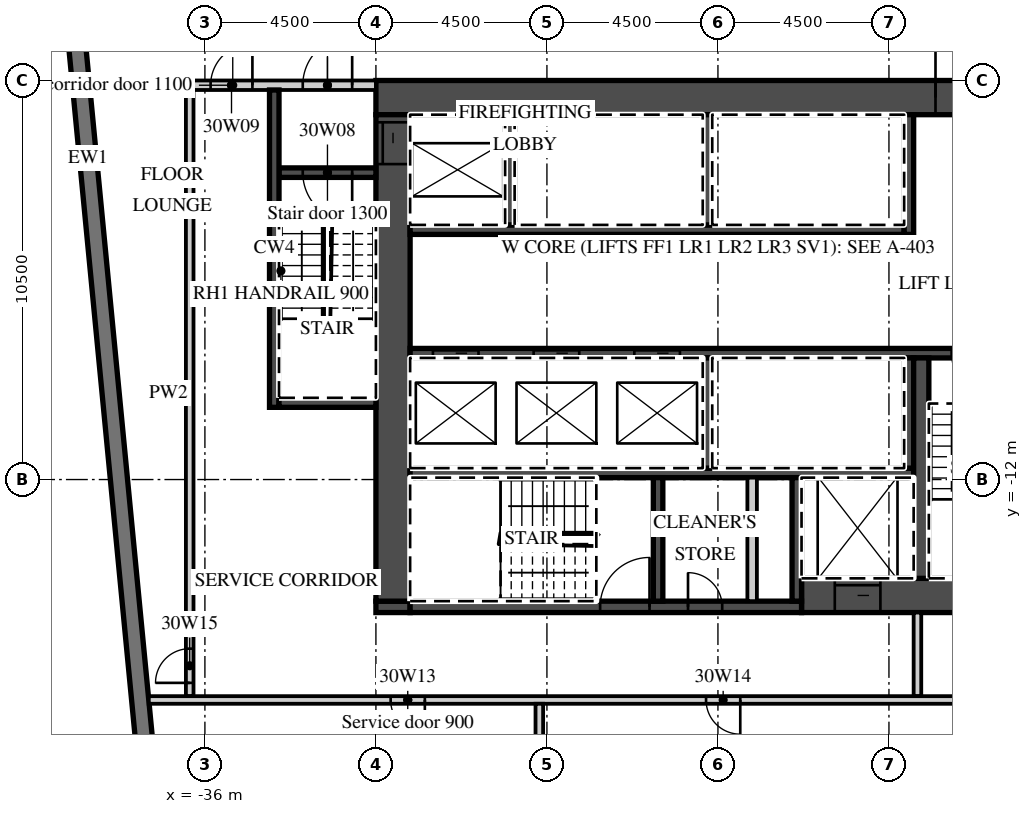
"""IFC4 building model, lengths in metres.
Left out: names, types, materials, properties, quantities, classifications, styles, units other than length and angle.
Written with IfcOpenShell. Run it as: python <this file> out.ifc"""

import sys

from ifc_helpers import new_model, si_unit, direction, frame, frame_2d, origin, place, context, subcontext, project, spatial, rectangle, extrude, element, fill, save


model = new_model("IFC4")
c1 = context("Model", 3, precision=1e-05, world=origin(), true_north=direction((0.0, 1.0)))
c2 = subcontext(c1, "Body", "Model", "MODEL_VIEW")
j1 = project(units=[si_unit("LENGTHUNIT", "METRE"), si_unit("PLANEANGLEUNIT", "RADIAN")], contexts=[c1])
p1 = place(None, origin())
s1 = spatial("IfcSite", under=j1, at=p1, CompositionType="ELEMENT")
p2 = place(p1, origin())
s2 = spatial("IfcBuilding", under=s1, at=p2, CompositionType="ELEMENT")
p3 = place(p2, frame((0.0, 0.0, 133.9)))
s3 = spatial("IfcBuildingStorey", under=s2, at=p3, CompositionType="ELEMENT", Elevation=133.9)
p4 = place(p3, frame((-40.753, 13.872, 0.0), z_axis=(0.0, 0.0, 1.0), x_axis=(0.095843327381, -0.995396431878, 0.0)))
e1 = element("IfcWall", 1, at=p4, inside=s3, PredefinedType="SOLIDWALL", context=c2, shape_type="SweptSolid", body=[
    extrude(rectangle(XDim=35.0, YDim=0.45, at=frame_2d((17.5, 0.0))), origin(), (0.0, 0.0, 1.0), 3.02),
])
p5 = place(p4, frame((4.277, 0.0, 0.45)))
e2 = element("IfcOpeningElement", 2, at=p5, cuts=e1, PredefinedType="OPENING", context=c2, shape_type="SweptSolid", body=[
    extrude(rectangle(XDim=3.3, YDim=2.25, at=frame_2d((1.65, 1.125))), frame((0.0, 0.235, 0.0), z_axis=(0.0, -1.0, 0.0), x_axis=(1.0, 0.0, 0.0)), (0.0, 0.0, 1.0), 0.47),
])
p6 = place(p4, frame((8.798, 0.0, 0.45)))
e3 = element("IfcOpeningElement", 3, at=p6, cuts=e1, PredefinedType="OPENING", context=c2, shape_type="SweptSolid", body=[
    extrude(rectangle(XDim=3.3, YDim=2.25, at=frame_2d((1.65, 1.125))), frame((0.0, 0.235, 0.0), z_axis=(0.0, -1.0, 0.0), x_axis=(1.0, 0.0, 0.0)), (0.0, 0.0, 1.0), 0.47),
])
p7 = place(p3, frame((-31.5, -1.95, 0.0), z_axis=(0.0, 0.0, 1.0), x_axis=(1.0, 0.0, 0.0)))
e4 = element("IfcWall", 4, at=p7, inside=s3, PredefinedType="SHEAR", context=c2, shape_type="SweptSolid", body=[
    extrude(rectangle(XDim=18.0, YDim=0.9, at=frame_2d((9.0, 0.0))), origin(), (0.0, 0.0, 1.0), 3.02),
])
p8 = place(p7, frame((14.725, 0.0, 0.0)))
e5 = element("IfcOpeningElement", 5, at=p8, cuts=e4, PredefinedType="OPENING", context=c2, shape_type="SweptSolid", body=[
    extrude(rectangle(XDim=1.8, YDim=2.1, at=frame_2d((0.9, 1.05))), frame((0.0, 0.46, 0.0), z_axis=(0.0, -1.0, 0.0), x_axis=(1.0, 0.0, 0.0)), (0.0, 0.0, 1.0), 0.92),
])
p9 = place(p3, frame((-20.3, -15.05, 0.0), z_axis=(0.0, 0.0, 1.0), x_axis=(1.0, 0.0, 0.0)))
e6 = element("IfcWall", 6, at=p9, inside=s3, PredefinedType="SHEAR", context=c2, shape_type="SweptSolid", body=[
    extrude(rectangle(XDim=6.8, YDim=0.9, at=frame_2d((3.4, 0.0))), origin(), (0.0, 0.0, 1.0), 3.02),
])
p10 = place(p9, frame((0.875, 0.0, 0.0)))
e7 = element("IfcOpeningElement", 7, at=p10, cuts=e6, PredefinedType="OPENING", context=c2, shape_type="SweptSolid", body=[
    extrude(rectangle(XDim=1.2, YDim=2.1, at=frame_2d((0.6, 1.05))), frame((0.0, 0.46, 0.0), z_axis=(0.0, -1.0, 0.0), x_axis=(1.0, 0.0, 0.0)), (0.0, 0.0, 1.0), 0.92),
])
p11 = place(p3, frame((-31.5, -15.35, 0.0), z_axis=(0.0, 0.0, 1.0), x_axis=(1.0, 0.0, 0.0)))
e8 = element("IfcWall", 8, at=p11, inside=s3, PredefinedType="SHEAR", context=c2, shape_type="SweptSolid", body=[
    extrude(rectangle(XDim=0.9, YDim=0.3, at=frame_2d((0.45, 0.0))), origin(), (0.0, 0.0, 1.0), 3.02),
])
p12 = place(p3, frame((-30.6, -15.35, 0.0), z_axis=(0.0, 0.0, 1.0), x_axis=(1.0, 0.0, 0.0)))
e9 = element("IfcWall", 9, at=p12, inside=s3, PredefinedType="SHEAR", context=c2, shape_type="SweptSolid", body=[
    extrude(rectangle(XDim=10.3, YDim=0.3, at=frame_2d((5.15, 0.0))), origin(), (0.0, 0.0, 1.0), 3.02),
])
p13 = place(p12, frame((5.0, 0.0, 0.0)))
e10 = element("IfcOpeningElement", 10, at=p13, cuts=e9, PredefinedType="OPENING", context=c2, shape_type="SweptSolid", body=[
    extrude(rectangle(XDim=1.3, YDim=2.1, at=frame_2d((0.65, 1.05))), frame((0.0, 0.16, 0.0), z_axis=(0.0, -1.0, 0.0), x_axis=(1.0, 0.0, 0.0)), (0.0, 0.0, 1.0), 0.32),
])
p14 = place(p12, frame((7.312, 0.0, 0.0)))
e11 = element("IfcOpeningElement", 11, at=p14, cuts=e9, PredefinedType="OPENING", context=c2, shape_type="SweptSolid", body=[
    extrude(rectangle(XDim=0.9, YDim=2.1, at=frame_2d((0.45, 1.05))), frame((0.0, 0.16, 0.0), z_axis=(0.0, -1.0, 0.0), x_axis=(1.0, 0.0, 0.0)), (0.0, 0.0, 1.0), 0.32),
])
p15 = place(p3, frame((-31.05, -15.2, 0.0), z_axis=(0.0, 0.0, 1.0), x_axis=(0.0, 1.0, 0.0)))
e12 = element("IfcWall", 12, at=p15, inside=s3, PredefinedType="SHEAR", context=c2, shape_type="SweptSolid", body=[
    extrude(rectangle(XDim=12.8, YDim=0.9, at=frame_2d((6.4, 0.0))), origin(), (0.0, 0.0, 1.0), 3.02),
])
p16 = place(p15, frame((11.5, 0.0, 0.0)))
e13 = element("IfcOpeningElement", 13, at=p16, cuts=e12, PredefinedType="OPENING", context=c2, shape_type="SweptSolid", body=[
    extrude(rectangle(XDim=1.1, YDim=2.1, at=frame_2d((0.55, 1.05))), frame((0.0, 0.46, 0.0), z_axis=(0.0, -1.0, 0.0), x_axis=(1.0, 0.0, 0.0)), (0.0, 0.0, 1.0), 0.92),
])
p17 = place(p3, frame((-30.6, -5.425, 0.0), z_axis=(0.0, 0.0, 1.0), x_axis=(1.0, 0.0, 0.0)))
e14 = element("IfcWall", 14, at=p17, inside=s3, PredefinedType="SHEAR", context=c2, shape_type="SweptSolid", body=[
    extrude(rectangle(XDim=13.0, YDim=0.25, at=frame_2d((6.5, 0.0))), origin(), (0.0, 0.0, 1.0), 3.02),
])
p18 = place(p3, frame((-17.475, -5.55, 0.0), z_axis=(0.0, 0.0, 1.0), x_axis=(0.0, 1.0, 0.0)))
e15 = element("IfcWall", 15, at=p18, inside=s3, PredefinedType="SHEAR", context=c2, shape_type="SweptSolid", body=[
    extrude(rectangle(XDim=3.15, YDim=0.25, at=frame_2d((1.575, 0.0))), origin(), (0.0, 0.0, 1.0), 3.02),
])
for number, where, z_axis, x_axis in (
    (16, (-27.975, -5.3, 0.0), (0.0, 0.0, 1.0), (0.0, 1.0, 0.0)),
    (17, (-22.775, -5.3, 0.0), (0.0, 0.0, 1.0), (0.0, 1.0, 0.0)),
):
    element("IfcWall", number, at=place(p3, frame(where, z_axis=z_axis, x_axis=x_axis)), inside=s3, PredefinedType="SHEAR", context=c2, shape_type="SweptSolid", body=[
        extrude(rectangle(XDim=2.9, YDim=0.25, at=frame_2d((1.45, 0.0))), origin(), (0.0, 0.0, 1.0), 3.02),
    ])
p19 = place(p3, frame((-30.6, -8.675, 0.0), z_axis=(0.0, 0.0, 1.0), x_axis=(1.0, 0.0, 0.0)))
e18 = element("IfcWall", 18, at=p19, inside=s3, PredefinedType="SHEAR", context=c2, shape_type="SweptSolid", body=[
    extrude(rectangle(XDim=16.2, YDim=0.25, at=frame_2d((8.1, 0.0))), origin(), (0.0, 0.0, 1.0), 3.02),
])
p20 = place(p19, frame((0.6, 0.0, 0.0)))
e19 = element("IfcOpeningElement", 19, at=p20, cuts=e18, PredefinedType="OPENING", context=c2, shape_type="SweptSolid", body=[
    extrude(rectangle(XDim=1.2, YDim=2.1, at=frame_2d((0.6, 1.05))), frame((0.0, 0.135, 0.0), z_axis=(0.0, -1.0, 0.0), x_axis=(1.0, 0.0, 0.0)), (0.0, 0.0, 1.0), 0.27),
])
p21 = place(p19, frame((3.25, 0.0, 0.0)))
e20 = element("IfcOpeningElement", 20, at=p21, cuts=e18, PredefinedType="OPENING", context=c2, shape_type="SweptSolid", body=[
    extrude(rectangle(XDim=1.2, YDim=2.1, at=frame_2d((0.6, 1.05))), frame((0.0, 0.135, 0.0), z_axis=(0.0, -1.0, 0.0), x_axis=(1.0, 0.0, 0.0)), (0.0, 0.0, 1.0), 0.27),
])
p22 = place(p19, frame((5.9, 0.0, 0.0)))
e21 = element("IfcOpeningElement", 21, at=p22, cuts=e18, PredefinedType="OPENING", context=c2, shape_type="SweptSolid", body=[
    extrude(rectangle(XDim=1.2, YDim=2.1, at=frame_2d((0.6, 1.05))), frame((0.0, 0.135, 0.0), z_axis=(0.0, -1.0, 0.0), x_axis=(1.0, 0.0, 0.0)), (0.0, 0.0, 1.0), 0.27),
])
p23 = place(p19, frame((14.25, 0.0, 0.0)))
e22 = element("IfcOpeningElement", 22, at=p23, cuts=e18, PredefinedType="OPENING", context=c2, shape_type="SweptSolid", body=[
    extrude(rectangle(XDim=1.3, YDim=2.1, at=frame_2d((0.65, 1.05))), frame((0.0, 0.135, 0.0), z_axis=(0.0, -1.0, 0.0), x_axis=(1.0, 0.0, 0.0)), (0.0, 0.0, 1.0), 0.27),
])
p24 = place(p3, frame((-30.6, -11.825, 0.0), z_axis=(0.0, 0.0, 1.0), x_axis=(1.0, 0.0, 0.0)))
e23 = element("IfcWall", 23, at=p24, inside=s3, PredefinedType="SHEAR", context=c2, shape_type="SweptSolid", body=[
    extrude(rectangle(XDim=13.25, YDim=0.25, at=frame_2d((6.625, 0.0))), origin(), (0.0, 0.0, 1.0), 3.02),
])
for number, where, z_axis, x_axis in (
    (24, (-17.475, -11.7, 0.0), (0.0, 0.0, 1.0), (0.0, 1.0, 0.0)),
    (25, (-22.775, -11.7, 0.0), (0.0, 0.0, 1.0), (0.0, 1.0, 0.0)),
):
    element("IfcWall", number, at=place(p3, frame(where, z_axis=z_axis, x_axis=x_axis)), inside=s3, PredefinedType="SHEAR", context=c2, shape_type="SweptSolid", body=[
        extrude(rectangle(XDim=2.9, YDim=0.25, at=frame_2d((1.45, 0.0))), origin(), (0.0, 0.0, 1.0), 3.02),
    ])
p25 = place(p3, frame((-17.15, -14.6, 0.0), z_axis=(0.0, 0.0, 1.0), x_axis=(0.0, 1.0, 0.0)))
e26 = element("IfcWall", 26, at=p25, inside=s3, PredefinedType="SHEAR", context=c2, shape_type="SweptSolid", body=[
    extrude(rectangle(XDim=5.8, YDim=0.4, at=frame_2d((2.9, 0.0))), origin(), (0.0, 0.0, 1.0), 3.02),
])
for number, where, z_axis, x_axis in (
    (27, (-20.425, -15.2, 0.0), (0.0, 0.0, 1.0), (0.0, 1.0, 0.0)),
    (28, (-24.075, -15.2, 0.0), (0.0, 0.0, 1.0), (0.0, 1.0, 0.0)),
):
    element("IfcWall", number, at=place(p3, frame(where, z_axis=z_axis, x_axis=x_axis)), inside=s3, PredefinedType="SHEAR", context=c2, shape_type="SweptSolid", body=[
        extrude(rectangle(XDim=3.25, YDim=0.25, at=frame_2d((1.625, 0.0))), origin(), (0.0, 0.0, 1.0), 3.02),
    ])
p26 = place(p3, frame((-21.6, -15.2, 0.0), z_axis=(0.0, 0.0, 1.0), x_axis=(0.0, 1.0, 0.0)))
e29 = element("IfcWall", 29, at=p26, inside=s3, PredefinedType="PARTITIONING", context=c2, shape_type="SweptSolid", body=[
    extrude(rectangle(XDim=3.25, YDim=0.25, at=frame_2d((1.625, 0.0))), origin(), (0.0, 0.0, 1.0), 3.02),
])
p27 = place(p3, frame((-39.035, -1.625, 0.0), z_axis=(0.0, 0.0, 1.0), x_axis=(1.0, 0.0, 0.0)))
e30 = element("IfcWall", 30, at=p27, inside=s3, PredefinedType="PARTITIONING", context=c2, shape_type="SweptSolid", body=[
    extrude(rectangle(XDim=7.535, YDim=0.25, at=frame_2d((3.768, 0.0))), origin(), (0.0, 0.0, 1.0), 3.02),
])
p28 = place(p27, frame((5.61, 0.0, 0.0)))
e31 = element("IfcOpeningElement", 31, at=p28, cuts=e30, PredefinedType="OPENING", context=c2, shape_type="SweptSolid", body=[
    extrude(rectangle(XDim=1.3, YDim=2.1, at=frame_2d((0.65, 1.05))), frame((0.0, 0.135, 0.0), z_axis=(0.0, -1.0, 0.0), x_axis=(1.0, 0.0, 0.0)), (0.0, 0.0, 1.0), 0.27),
])
p29 = place(p27, frame((3.185, 0.0, 0.0)))
e32 = element("IfcOpeningElement", 32, at=p29, cuts=e30, PredefinedType="OPENING", context=c2, shape_type="SweptSolid", body=[
    extrude(rectangle(XDim=1.1, YDim=2.1, at=frame_2d((0.55, 1.05))), frame((0.0, 0.135, 0.0), z_axis=(0.0, -1.0, 0.0), x_axis=(1.0, 0.0, 0.0)), (0.0, 0.0, 1.0), 0.27),
])
p30 = place(p3, frame((-34.05, -3.925, 0.0), z_axis=(0.0, 0.0, 1.0), x_axis=(1.0, 0.0, 0.0)))
e33 = element("IfcWall", 33, at=p30, inside=s3, PredefinedType="SHEAR", context=c2, shape_type="SweptSolid", body=[
    extrude(rectangle(XDim=2.55, YDim=0.25, at=frame_2d((1.275, 0.0))), origin(), (0.0, 0.0, 1.0), 3.02),
])
p31 = place(p30, frame((0.625, 0.0, 0.0)))
e34 = element("IfcOpeningElement", 34, at=p31, cuts=e33, PredefinedType="OPENING", context=c2, shape_type="SweptSolid", body=[
    extrude(rectangle(XDim=1.3, YDim=2.1, at=frame_2d((0.65, 1.05))), frame((0.0, 0.135, 0.0), z_axis=(0.0, -1.0, 0.0), x_axis=(1.0, 0.0, 0.0)), (0.0, 0.0, 1.0), 0.27),
])
p32 = place(p3, frame((-34.175, -10.1, 0.0), z_axis=(0.0, 0.0, 1.0), x_axis=(0.0, 1.0, 0.0)))
e35 = element("IfcWall", 35, at=p32, inside=s3, PredefinedType="SHEAR", context=c2, shape_type="SweptSolid", body=[
    extrude(rectangle(XDim=8.35, YDim=0.25, at=frame_2d((4.175, 0.0))), origin(), (0.0, 0.0, 1.0), 3.02),
])
p33 = place(p3, frame((-34.05, -9.975, 0.0), z_axis=(0.0, 0.0, 1.0), x_axis=(1.0, 0.0, 0.0)))
e36 = element("IfcWall", 36, at=p33, inside=s3, PredefinedType="SHEAR", context=c2, shape_type="SweptSolid", body=[
    extrude(rectangle(XDim=2.55, YDim=0.25, at=frame_2d((1.275, 0.0))), origin(), (0.0, 0.0, 1.0), 3.02),
])
p34 = place(p3, frame((-17.25, -17.7, 0.0), z_axis=(0.0, 0.0, 1.0), x_axis=(0.0, 1.0, 0.0)))
e37 = element("IfcWall", 37, at=p34, inside=s3, PredefinedType="PARTITIONING", context=c2, shape_type="SweptSolid", body=[
    extrude(rectangle(XDim=2.2, YDim=0.2, at=frame_2d((1.1, 0.0))), origin(), (0.0, 0.0, 1.0), 3.02),
])
p35 = place(p3, frame((-36.4, -17.7, 0.0), z_axis=(0.0, 0.0, 1.0), x_axis=(0.0, 1.0, 0.0)))
e38 = element("IfcWall", 38, at=p35, inside=s3, PredefinedType="PARTITIONING", context=c2, shape_type="SweptSolid", body=[
    extrude(rectangle(XDim=15.95, YDim=0.2, at=frame_2d((7.975, 0.0))), origin(), (0.0, 0.0, 1.0), 3.02),
])
p36 = place(p35, frame((0.35, 0.0, 0.0)))
e39 = element("IfcOpeningElement", 39, at=p36, cuts=e38, PredefinedType="OPENING", context=c2, shape_type="SweptSolid", body=[
    extrude(rectangle(XDim=0.9, YDim=2.1, at=frame_2d((0.45, 1.05))), frame((0.0, 0.11, 0.0), z_axis=(0.0, -1.0, 0.0), x_axis=(1.0, 0.0, 0.0)), (0.0, 0.0, 1.0), 0.22),
])
p37 = place(p3, frame((-37.477, -17.8, 0.0), z_axis=(0.0, 0.0, 1.0), x_axis=(1.0, 0.0, 0.0)))
e40 = element("IfcWall", 40, at=p37, inside=s3, PredefinedType="PARTITIONING", context=c2, shape_type="SweptSolid", body=[
    extrude(rectangle(XDim=23.877, YDim=0.2, at=frame_2d((11.938, 0.0))), origin(), (0.0, 0.0, 1.0), 3.02),
])
p38 = place(p37, frame((6.365, 0.0, 0.0)))
e41 = element("IfcOpeningElement", 41, at=p38, cuts=e40, PredefinedType="OPENING", context=c2, shape_type="SweptSolid", body=[
    extrude(rectangle(XDim=0.9, YDim=2.1, at=frame_2d((0.45, 1.05))), frame((0.0, 0.11, 0.0), z_axis=(0.0, -1.0, 0.0), x_axis=(1.0, 0.0, 0.0)), (0.0, 0.0, 1.0), 0.22),
])
p39 = place(p37, frame((14.665, 0.0, 0.0)))
e42 = element("IfcOpeningElement", 42, at=p39, cuts=e40, PredefinedType="OPENING", context=c2, shape_type="SweptSolid", body=[
    extrude(rectangle(XDim=0.9, YDim=2.1, at=frame_2d((0.45, 1.05))), frame((0.0, 0.11, 0.0), z_axis=(0.0, -1.0, 0.0), x_axis=(1.0, 0.0, 0.0)), (0.0, 0.0, 1.0), 0.22),
])
p40 = place(p3, frame((-27.2, -23.552, 0.0), z_axis=(0.0, 0.0, 1.0), x_axis=(0.0, 1.0, 0.0)))
e43 = element("IfcWall", 43, at=p40, inside=s3, PredefinedType="PARTITIONING", context=c2, shape_type="SweptSolid", body=[
    extrude(rectangle(XDim=5.653, YDim=0.2, at=frame_2d((2.826, 0.0))), origin(), (0.0, 0.0, 1.0), 3.02),
])
p41 = place(p20, origin())
e44 = element("IfcDoor", 44, at=p41, inside=s3, OperationType="SLIDING_TO_LEFT", PredefinedType="DOOR", context=c2, shape_type="SweptSolid", body=[
    extrude(rectangle(XDim=1.2, YDim=2.1, at=frame_2d((0.6, 1.05))), frame((0.0, 0.025, 0.0), z_axis=(0.0, -1.0, 0.0), x_axis=(1.0, 0.0, 0.0)), (0.0, 0.0, 1.0), 0.05),
])
fill(e19, e44)
p42 = place(p21, origin())
e45 = element("IfcDoor", 45, at=p42, inside=s3, OperationType="SLIDING_TO_RIGHT", PredefinedType="DOOR", context=c2, shape_type="SweptSolid", body=[
    extrude(rectangle(XDim=1.2, YDim=2.1, at=frame_2d((0.6, 1.05))), frame((0.0, 0.025, 0.0), z_axis=(0.0, -1.0, 0.0), x_axis=(1.0, 0.0, 0.0)), (0.0, 0.0, 1.0), 0.05),
])
fill(e20, e45)
p43 = place(p22, origin())
e46 = element("IfcDoor", 46, at=p43, inside=s3, OperationType="SLIDING_TO_RIGHT", PredefinedType="DOOR", context=c2, shape_type="SweptSolid", body=[
    extrude(rectangle(XDim=1.2, YDim=2.1, at=frame_2d((0.6, 1.05))), frame((0.0, 0.025, 0.0), z_axis=(0.0, -1.0, 0.0), x_axis=(1.0, 0.0, 0.0)), (0.0, 0.0, 1.0), 0.05),
])
fill(e21, e46)
p44 = place(p10, origin())
e47 = element("IfcDoor", 47, at=p44, inside=s3, OperationType="SLIDING_TO_LEFT", PredefinedType="DOOR", context=c2, shape_type="SweptSolid", body=[
    extrude(rectangle(XDim=1.2, YDim=2.1, at=frame_2d((0.6, 1.05))), frame((0.0, 0.025, 0.0), z_axis=(0.0, -1.0, 0.0), x_axis=(1.0, 0.0, 0.0)), (0.0, 0.0, 1.0), 0.05),
])
fill(e7, e47)
p45 = place(p16, origin())
e48 = element("IfcDoor", 48, at=p45, inside=s3, OperationType="SLIDING_TO_RIGHT", PredefinedType="DOOR", context=c2, shape_type="SweptSolid", body=[
    extrude(rectangle(XDim=1.1, YDim=2.1, at=frame_2d((0.55, 1.05))), frame((0.0, 0.025, 0.0), z_axis=(0.0, -1.0, 0.0), x_axis=(1.0, 0.0, 0.0)), (0.0, 0.0, 1.0), 0.05),
])
fill(e13, e48)
p46 = place(p8, origin())
e49 = element("IfcDoor", 49, at=p46, inside=s3, OperationType="DOUBLE_DOOR_DOUBLE_SWING", PredefinedType="DOOR", context=c2, shape_type="SweptSolid", body=[
    extrude(rectangle(XDim=1.8, YDim=2.1, at=frame_2d((0.9, 1.05))), frame((0.0, 0.025, 0.0), z_axis=(0.0, -1.0, 0.0), x_axis=(1.0, 0.0, 0.0)), (0.0, 0.0, 1.0), 0.05),
])
fill(e5, e49)
p47 = place(p28, origin())
e50 = element("IfcDoor", 50, at=p47, inside=s3, OperationType="SINGLE_SWING_RIGHT", PredefinedType="DOOR", context=c2, shape_type="SweptSolid", body=[
    extrude(rectangle(XDim=1.3, YDim=2.1, at=frame_2d((0.65, 1.05))), frame((0.0, 0.025, 0.0), z_axis=(0.0, -1.0, 0.0), x_axis=(1.0, 0.0, 0.0)), (0.0, 0.0, 1.0), 0.05),
])
fill(e31, e50)
p48 = place(p31, origin())
e51 = element("IfcDoor", 51, at=p48, inside=s3, OperationType="SINGLE_SWING_RIGHT", PredefinedType="DOOR", context=c2, shape_type="SweptSolid", body=[
    extrude(rectangle(XDim=1.3, YDim=2.1, at=frame_2d((0.65, 1.05))), frame((0.0, 0.025, 0.0), z_axis=(0.0, -1.0, 0.0), x_axis=(1.0, 0.0, 0.0)), (0.0, 0.0, 1.0), 0.05),
])
fill(e34, e51)
p49 = place(p29, origin())
e52 = element("IfcDoor", 52, at=p49, inside=s3, OperationType="SINGLE_SWING_RIGHT", PredefinedType="DOOR", context=c2, shape_type="SweptSolid", body=[
    extrude(rectangle(XDim=1.1, YDim=2.1, at=frame_2d((0.55, 1.05))), frame((0.0, 0.025, 0.0), z_axis=(0.0, -1.0, 0.0), x_axis=(1.0, 0.0, 0.0)), (0.0, 0.0, 1.0), 0.05),
])
fill(e32, e52)
p50 = place(p23, origin())
e53 = element("IfcDoor", 53, at=p50, inside=s3, OperationType="SINGLE_SWING_RIGHT", PredefinedType="DOOR", context=c2, shape_type="SweptSolid", body=[
    extrude(rectangle(XDim=1.3, YDim=2.1, at=frame_2d((0.65, 1.05))), frame((0.0, 0.025, 0.0), z_axis=(0.0, -1.0, 0.0), x_axis=(1.0, 0.0, 0.0)), (0.0, 0.0, 1.0), 0.05),
])
fill(e22, e53)
p51 = place(p13, origin())
e54 = element("IfcDoor", 54, at=p51, inside=s3, OperationType="SINGLE_SWING_RIGHT", PredefinedType="DOOR", context=c2, shape_type="SweptSolid", body=[
    extrude(rectangle(XDim=1.3, YDim=2.1, at=frame_2d((0.65, 1.05))), frame((0.0, 0.025, 0.0), z_axis=(0.0, -1.0, 0.0), x_axis=(1.0, 0.0, 0.0)), (0.0, 0.0, 1.0), 0.05),
])
fill(e10, e54)
p52 = place(p14, origin())
e55 = element("IfcDoor", 55, at=p52, inside=s3, OperationType="SINGLE_SWING_LEFT", PredefinedType="DOOR", context=c2, shape_type="SweptSolid", body=[
    extrude(rectangle(XDim=0.9, YDim=2.1, at=frame_2d((0.45, 1.05))), frame((0.0, 0.025, 0.0), z_axis=(0.0, -1.0, 0.0), x_axis=(1.0, 0.0, 0.0)), (0.0, 0.0, 1.0), 0.05),
])
fill(e11, e55)
p53 = place(p38, origin())
e56 = element("IfcDoor", 56, at=p53, inside=s3, OperationType="SINGLE_SWING_RIGHT", PredefinedType="DOOR", context=c2, shape_type="SweptSolid", body=[
    extrude(rectangle(XDim=0.9, YDim=2.1, at=frame_2d((0.45, 1.05))), frame((0.0, 0.025, 0.0), z_axis=(0.0, -1.0, 0.0), x_axis=(1.0, 0.0, 0.0)), (0.0, 0.0, 1.0), 0.05),
])
fill(e41, e56)
p54 = place(p39, origin())
e57 = element("IfcDoor", 57, at=p54, inside=s3, OperationType="SINGLE_SWING_RIGHT", PredefinedType="DOOR", context=c2, shape_type="SweptSolid", body=[
    extrude(rectangle(XDim=0.9, YDim=2.1, at=frame_2d((0.45, 1.05))), frame((0.0, 0.025, 0.0), z_axis=(0.0, -1.0, 0.0), x_axis=(1.0, 0.0, 0.0)), (0.0, 0.0, 1.0), 0.05),
])
fill(e42, e57)
p55 = place(p36, origin())
e58 = element("IfcDoor", 58, at=p55, inside=s3, OperationType="SINGLE_SWING_LEFT", PredefinedType="DOOR", context=c2, shape_type="SweptSolid", body=[
    extrude(rectangle(XDim=0.9, YDim=2.1, at=frame_2d((0.45, 1.05))), frame((0.0, 0.025, 0.0), z_axis=(0.0, -1.0, 0.0), x_axis=(1.0, 0.0, 0.0)), (0.0, 0.0, 1.0), 0.05),
])
fill(e39, e58)
save(model, sys.argv[1])
